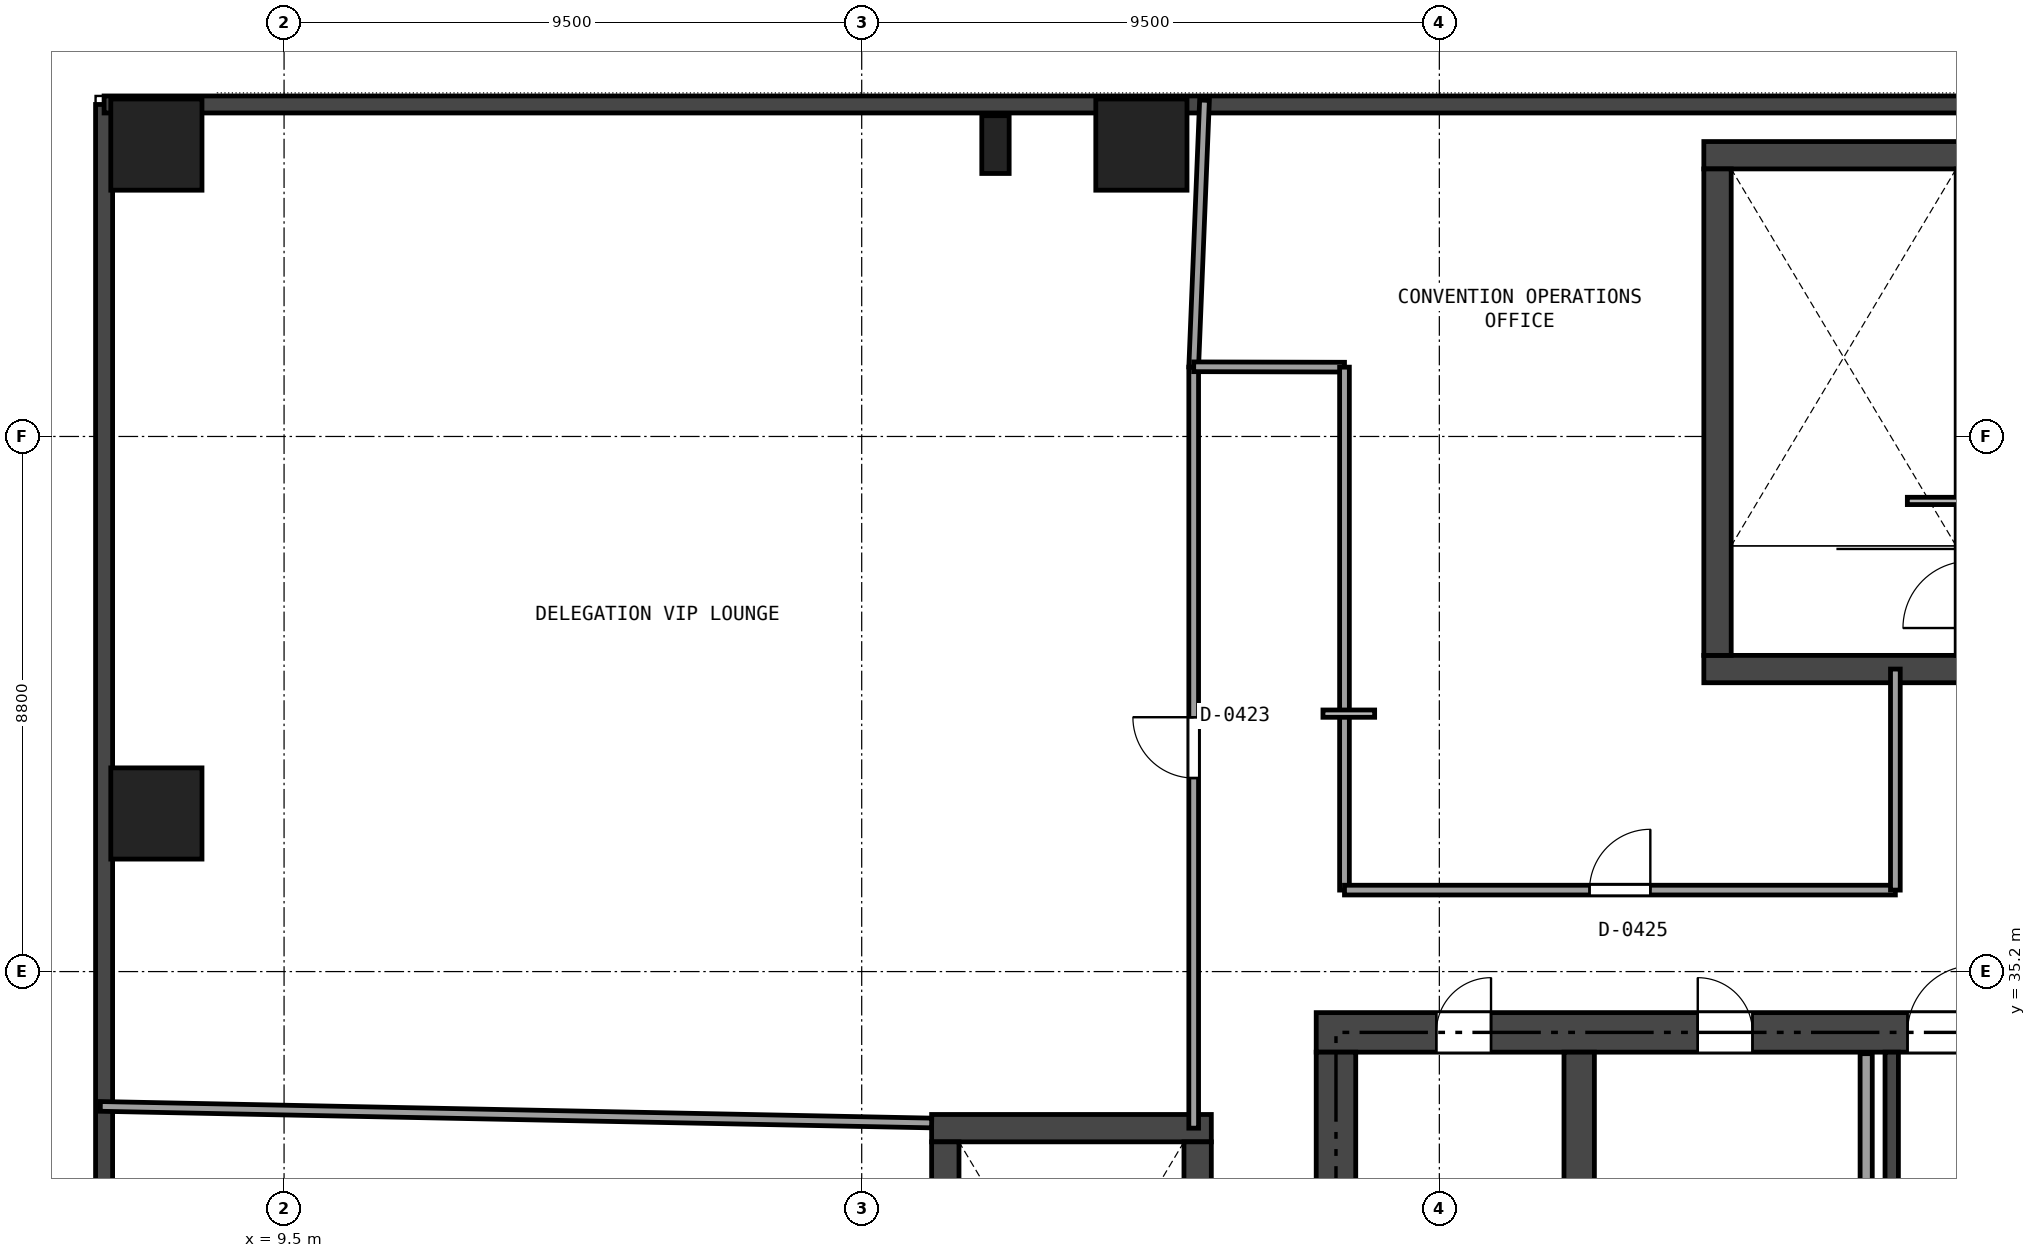
"""IFC4 building model, lengths in metres.
Left out: names, types, materials, properties, quantities, classifications, styles, units other than length and angle.
Written with IfcOpenShell. Run it as: python <this file> out.ifc"""

import sys

from ifc_helpers import new_model, si_unit, direction, frame, frame_2d, origin, origin_2d, place, context, subcontext, project, spatial, rectangle, extrude, element, fill, save


model = new_model("IFC4")
c1 = context("Model", 3, precision=1e-05, world=origin(), true_north=direction((0.0, 1.0)))
c2 = subcontext(c1, "Body", "Model", "MODEL_VIEW")
j1 = project(units=[si_unit("LENGTHUNIT", "METRE"), si_unit("PLANEANGLEUNIT", "RADIAN")], contexts=[c1])
p1 = place(None, origin())
s1 = spatial("IfcSite", under=j1, at=p1, CompositionType="ELEMENT")
p2 = place(p1, origin())
s2 = spatial("IfcBuilding", under=s1, at=p2, CompositionType="ELEMENT")
p3 = place(p2, frame((0.0, 0.0, 21.6)))
s3 = spatial("IfcBuildingStorey", under=s2, at=p3, CompositionType="ELEMENT", Elevation=21.6)
p4 = place(p3, frame((26.475, 34.2, 0.0), z_axis=(0.0, 0.0, 1.0), x_axis=(1.0, 0.0, 0.0)))
e1 = element("IfcWall", 1, at=p4, inside=s3, PredefinedType="SHEAR", context=c2, shape_type="SweptSolid", body=[
    extrude(rectangle(XDim=21.45, YDim=0.65, at=frame_2d((10.725, 0.0))), origin(), (0.0, 0.0, 1.0), 4.98),
])
p5 = place(p4, frame((9.725, 0.0, 0.0)))
e2 = element("IfcOpeningElement", 2, at=p5, cuts=e1, PredefinedType="OPENING", context=c2, shape_type="SweptSolid", body=[
    extrude(rectangle(XDim=1.1, YDim=2.15, at=frame_2d((0.55, 1.075))), frame((0.0, 0.335, 0.0), z_axis=(0.0, -1.0, 0.0), x_axis=(1.0, 0.0, 0.0)), (0.0, 0.0, 1.0), 0.67),
])
p6 = place(p4, frame((1.975, 0.0, 0.0)))
e3 = element("IfcOpeningElement", 3, at=p6, cuts=e1, PredefinedType="OPENING", context=c2, shape_type="SweptSolid", body=[
    extrude(rectangle(XDim=0.9, YDim=2.1, at=frame_2d((0.45, 1.05))), frame((0.0, 0.335, 0.0), z_axis=(0.0, -1.0, 0.0), x_axis=(1.0, 0.0, 0.0)), (0.0, 0.0, 1.0), 0.67),
])
p7 = place(p4, frame((6.275, 0.0, 0.0)))
e4 = element("IfcOpeningElement", 4, at=p7, cuts=e1, PredefinedType="OPENING", context=c2, shape_type="SweptSolid", body=[
    extrude(rectangle(XDim=0.9, YDim=2.1, at=frame_2d((0.45, 1.05))), frame((0.0, 0.335, 0.0), z_axis=(0.0, -1.0, 0.0), x_axis=(1.0, 0.0, 0.0)), (0.0, 0.0, 1.0), 0.67),
])
p8 = place(p3, frame((26.8, 18.925, 0.0), z_axis=(0.0, 0.0, 1.0), x_axis=(0.0, 1.0, 0.0)))
e5 = element("IfcWall", 5, at=p8, inside=s3, PredefinedType="SHEAR", context=c2, shape_type="SweptSolid", body=[
    extrude(rectangle(XDim=14.95, YDim=0.65, at=frame_2d((7.475, 0.0))), origin(), (0.0, 0.0, 1.0), 4.98),
])
p9 = place(p3, frame((30.8, 18.925, 0.0), z_axis=(0.0, 0.0, 1.0), x_axis=(0.0, 1.0, 0.0)))
e6 = element("IfcWall", 6, at=p9, inside=s3, PredefinedType="SHEAR", context=c2, shape_type="SweptSolid", body=[
    extrude(rectangle(XDim=14.95, YDim=0.5, at=frame_2d((7.475, 0.0))), origin(), (0.0, 0.0, 1.0), 4.98),
])
p10 = place(p9, frame((6.575, 0.0, 0.0)))
e7 = element("IfcOpeningElement", 7, at=p10, cuts=e6, PredefinedType="OPENING", context=c2, shape_type="SweptSolid", body=[
    extrude(rectangle(XDim=1.1, YDim=2.15, at=frame_2d((0.55, 1.075))), frame((0.0, 0.26, 0.0), z_axis=(0.0, -1.0, 0.0), x_axis=(1.0, 0.0, 0.0)), (0.0, 0.0, 1.0), 0.52),
])
p11 = place(p9, frame((8.375, 0.0, 0.0)))
e8 = element("IfcOpeningElement", 8, at=p11, cuts=e6, PredefinedType="OPENING", context=c2, shape_type="SweptSolid", body=[
    extrude(rectangle(XDim=0.9, YDim=2.1, at=frame_2d((0.45, 1.05))), frame((0.0, 0.26, 0.0), z_axis=(0.0, -1.0, 0.0), x_axis=(1.0, 0.0, 0.0)), (0.0, 0.0, 1.0), 0.52),
])
p12 = place(p3, frame((35.94, 30.75, 0.0), z_axis=(0.0, 0.0, 1.0), x_axis=(0.0, 1.0, 0.0)))
e9 = element("IfcWall", 9, at=p12, inside=s3, PredefinedType="SHEAR", context=c2, shape_type="SweptSolid", body=[
    extrude(rectangle(XDim=3.125, YDim=0.22, at=frame_2d((1.562, 0.0))), origin(), (0.0, 0.0, 1.0), 4.98),
])
p13 = place(p3, frame((20.15, 32.625, 0.0), z_axis=(0.0, 0.0, 1.0), x_axis=(1.0, 0.0, 0.0)))
e10 = element("IfcWall", 10, at=p13, inside=s3, PredefinedType="SHEAR", context=c2, shape_type="SweptSolid", body=[
    extrude(rectangle(XDim=4.6, YDim=0.45, at=frame_2d((2.3, 0.0))), origin(), (0.0, 0.0, 1.0), 4.98),
])
p14 = place(p3, frame((20.375, 24.4, 0.0), z_axis=(0.0, 0.0, 1.0), x_axis=(0.0, 1.0, 0.0)))
e11 = element("IfcWall", 11, at=p14, inside=s3, PredefinedType="SHEAR", context=c2, shape_type="SweptSolid", body=[
    extrude(rectangle(XDim=8.0, YDim=0.45, at=frame_2d((4.0, 0.0))), origin(), (0.0, 0.0, 1.0), 4.98),
])
p15 = place(p3, frame((24.525, 24.4, 0.0), z_axis=(0.0, 0.0, 1.0), x_axis=(0.0, 1.0, 0.0)))
e12 = element("IfcWall", 12, at=p15, inside=s3, PredefinedType="SHEAR", context=c2, shape_type="SweptSolid", body=[
    extrude(rectangle(XDim=8.0, YDim=0.45, at=frame_2d((4.0, 0.0))), origin(), (0.0, 0.0, 1.0), 4.98),
])
p16 = place(p15, frame((0.45, 0.0, 0.0)))
e13 = element("IfcOpeningElement", 13, at=p16, cuts=e12, PredefinedType="OPENING", context=c2, shape_type="SweptSolid", body=[
    extrude(rectangle(XDim=1.1, YDim=2.15, at=frame_2d((0.55, 1.075))), frame((0.0, 0.235, 0.0), z_axis=(0.0, -1.0, 0.0), x_axis=(1.0, 0.0, 0.0)), (0.0, 0.0, 1.0), 0.47),
])
for number, where, z_axis, x_axis in (
    (14, (32.85, 40.175, 0.0), (0.0, 0.0, 1.0), (1.0, 0.0, 0.0)),
    (15, (32.85, 48.625, 0.0), (0.0, 0.0, 1.0), (1.0, 0.0, 0.0)),
):
    element("IfcWall", number, at=place(p3, frame(where, z_axis=z_axis, x_axis=x_axis)), inside=s3, PredefinedType="SHEAR", context=c2, shape_type="SweptSolid", body=[
        extrude(rectangle(XDim=4.6, YDim=0.45, at=frame_2d((2.3, 0.0))), origin(), (0.0, 0.0, 1.0), 4.98),
    ])
p17 = place(p3, frame((33.075, 40.4, 0.0), z_axis=(0.0, 0.0, 1.0), x_axis=(0.0, 1.0, 0.0)))
e16 = element("IfcWall", 16, at=p17, inside=s3, PredefinedType="SHEAR", context=c2, shape_type="SweptSolid", body=[
    extrude(rectangle(XDim=8.0, YDim=0.45, at=frame_2d((4.0, 0.0))), origin(), (0.0, 0.0, 1.0), 4.98),
])
for number, where, z_axis, x_axis in (
    (17, (23.6, 48.8, 0.0), (0.0, 0.0, 1.0), (1.0, 0.0, 0.0)),
    (18, (7.4, 48.8, 0.0), (0.0, 0.0, 1.0), (1.0, 0.0, 0.0)),
    (19, (7.4, 37.8, 0.0), (0.0, 0.0, 1.0), (1.0, 0.0, 0.0)),
):
    element("IfcColumn", number, at=place(p3, frame(where, z_axis=z_axis, x_axis=x_axis)), inside=s3, PredefinedType="COLUMN", context=c2, shape_type="SweptSolid", body=[
        extrude(rectangle(XDim=1.5, YDim=1.5, at=origin_2d()), origin(), (0.0, 0.0, 1.0), 4.98),
    ])
p18 = place(p3, frame((21.2, 48.8, 0.0), z_axis=(0.0, 0.0, 1.0), x_axis=(1.0, 0.0, 0.0)))
e20 = element("IfcColumn", 20, at=p18, inside=s3, PredefinedType="PILASTER", context=c2, shape_type="SweptSolid", body=[
    extrude(rectangle(XDim=0.45, YDim=0.95, at=origin_2d()), origin(), (0.0, 0.0, 1.0), 4.98),
])
p19 = place(p3, frame((6.54, 10.74, 0.0), z_axis=(0.0, 0.0, 1.0), x_axis=(0.0, 1.0, 0.0)))
e21 = element("IfcWall", 21, at=p19, inside=s3, PredefinedType="SOLIDWALL", context=c2, shape_type="SweptSolid", body=[
    extrude(rectangle(XDim=38.72, YDim=0.28, at=frame_2d((19.36, 0.0))), origin(), (0.0, 0.0, 1.0), 4.98),
])
p20 = place(p3, frame((6.54, 49.46, 0.0), z_axis=(0.0, 0.0, 1.0), x_axis=(1.0, 0.0, 0.0)))
e22 = element("IfcWall", 22, at=p20, inside=s3, PredefinedType="SOLIDWALL", context=c2, shape_type="SweptSolid", body=[
    extrude(rectangle(XDim=61.32, YDim=0.28, at=frame_2d((30.66, 0.0))), origin(), (0.0, 0.0, 1.0), 4.98),
])
p21 = place(p3, frame((35.52, 18.95, 0.0), z_axis=(0.0, 0.0, 1.0), x_axis=(0.0, 1.0, 0.0)))
e23 = element("IfcWall", 23, at=p21, inside=s3, PredefinedType="SOLIDWALL", context=c2, shape_type="SweptSolid", body=[
    extrude(rectangle(XDim=14.9, YDim=0.2, at=frame_2d((7.45, 0.0))), origin(), (0.0, 0.0, 1.0), 4.501),
])
p22 = place(p21, frame((7.755, 0.0, 0.0)))
e24 = element("IfcOpeningElement", 24, at=p22, cuts=e23, PredefinedType="OPENING", context=c2, shape_type="SweptSolid", body=[
    extrude(rectangle(XDim=0.95, YDim=2.15, at=frame_2d((0.475, 1.075))), frame((0.0, 0.11, 0.0), z_axis=(0.0, -1.0, 0.0), x_axis=(1.0, 0.0, 0.0)), (0.0, 0.0, 1.0), 0.22),
])
p23 = place(p21, frame((0.6, 0.0, 0.0)))
e25 = element("IfcOpeningElement", 25, at=p23, cuts=e23, PredefinedType="OPENING", context=c2, shape_type="SweptSolid", body=[
    extrude(rectangle(XDim=0.9, YDim=2.1, at=frame_2d((0.45, 1.05))), frame((0.0, 0.11, 0.0), z_axis=(0.0, -1.0, 0.0), x_axis=(1.0, 0.0, 0.0)), (0.0, 0.0, 1.0), 0.22),
])
p24 = place(p3, frame((20.15, 32.71, 0.0), z_axis=(0.0, 0.0, 1.0), x_axis=(-0.999800773201, 0.019960308294, 0.0)))
e26 = element("IfcWall", 26, at=p24, inside=s3, PredefinedType="PARTITIONING", context=c2, shape_type="SweptSolid", body=[
    extrude(rectangle(XDim=13.675, YDim=0.16, at=frame_2d((6.837, 0.0))), origin(), (0.0, 0.0, 1.0), 4.121),
])
p25 = place(p3, frame((24.46, 32.625, 0.0), z_axis=(0.0, 0.0, 1.0), x_axis=(0.0, 1.0, 0.0)))
e27 = element("IfcWall", 27, at=p25, inside=s3, PredefinedType="PARTITIONING", context=c2, shape_type="SweptSolid", body=[
    extrude(rectangle(XDim=12.515, YDim=0.16, at=frame_2d((6.257, 0.0))), origin(), (0.0, 0.0, 1.0), 3.847),
])
p26 = place(p25, frame((5.758, 0.0, 0.0)))
e28 = element("IfcOpeningElement", 28, at=p26, cuts=e27, PredefinedType="OPENING", context=c2, shape_type="SweptSolid", body=[
    extrude(rectangle(XDim=1.0, YDim=2.15, at=frame_2d((0.5, 1.075))), frame((0.0, 0.09, 0.0), z_axis=(0.0, -1.0, 0.0), x_axis=(1.0, 0.0, 0.0)), (0.0, 0.0, 1.0), 0.18),
])
p27 = place(p3, frame((24.46, 45.14, 0.0), z_axis=(0.0, 0.0, 1.0), x_axis=(0.040507266643, 0.999179243854, 0.0)))
e29 = element("IfcWall", 29, at=p27, inside=s3, PredefinedType="PARTITIONING", context=c2, shape_type="SweptSolid", body=[
    extrude(rectangle(XDim=4.394, YDim=0.16, at=frame_2d((2.197, 0.0))), origin(), (0.0, 0.0, 1.0), 3.847),
])
p28 = place(p3, frame((24.46, 45.146, 0.0), z_axis=(0.0, 0.0, 1.0), x_axis=(0.999996971472, -0.002461106939, 0.0)))
e30 = element("IfcWall", 30, at=p28, inside=s3, PredefinedType="PARTITIONING", context=c2, shape_type="SweptSolid", body=[
    extrude(rectangle(XDim=2.48, YDim=0.16, at=frame_2d((1.24, 0.0))), origin(), (0.0, 0.0, 1.0), 3.847),
])
p29 = place(p3, frame((26.94, 45.14, 0.0), z_axis=(0.0, 0.0, 1.0), x_axis=(0.0, -1.0, 0.0)))
e31 = element("IfcWall", 31, at=p29, inside=s3, PredefinedType="PARTITIONING", context=c2, shape_type="SweptSolid", body=[
    extrude(rectangle(XDim=8.6, YDim=0.16, at=frame_2d((4.3, 0.0))), origin(), (0.0, 0.0, 1.0), 3.847),
])
p30 = place(p3, frame((26.94, 36.54, 0.0), z_axis=(0.0, 0.0, 1.0), x_axis=(1.0, 0.0, 0.0)))
e32 = element("IfcWall", 32, at=p30, inside=s3, PredefinedType="PARTITIONING", context=c2, shape_type="SweptSolid", body=[
    extrude(rectangle(XDim=9.06, YDim=0.16, at=frame_2d((4.53, 0.0))), origin(), (0.0, 0.0, 1.0), 3.847),
])
p31 = place(p30, frame((4.03, 0.0, 0.0)))
e33 = element("IfcOpeningElement", 33, at=p31, cuts=e32, PredefinedType="OPENING", context=c2, shape_type="SweptSolid", body=[
    extrude(rectangle(XDim=1.0, YDim=2.15, at=frame_2d((0.5, 1.075))), frame((0.0, 0.09, 0.0), z_axis=(0.0, -1.0, 0.0), x_axis=(1.0, 0.0, 0.0)), (0.0, 0.0, 1.0), 0.18),
])
p32 = place(p3, frame((36.0, 36.54, 0.0), z_axis=(0.0, 0.0, 1.0), x_axis=(0.0, 1.0, 0.0)))
e34 = element("IfcWall", 34, at=p32, inside=s3, PredefinedType="PARTITIONING", context=c2, shape_type="SweptSolid", body=[
    extrude(rectangle(XDim=3.635, YDim=0.16, at=frame_2d((1.817, 0.0))), origin(), (0.0, 0.0, 1.0), 4.98),
])
p33 = place(p5, origin())
e35 = element("IfcDoor", 35, at=p33, inside=s3, OperationType="SINGLE_SWING_RIGHT", PredefinedType="DOOR", context=c2, shape_type="SweptSolid", body=[
    extrude(rectangle(XDim=1.1, YDim=2.15, at=frame_2d((0.55, 1.075))), frame((0.0, 0.025, 0.0), z_axis=(0.0, -1.0, 0.0), x_axis=(1.0, 0.0, 0.0)), (0.0, 0.0, 1.0), 0.05),
])
fill(e2, e35)
p34 = place(p6, origin())
e36 = element("IfcDoor", 36, at=p34, inside=s3, OperationType="SINGLE_SWING_RIGHT", PredefinedType="DOOR", context=c2, shape_type="SweptSolid", body=[
    extrude(rectangle(XDim=0.9, YDim=2.1, at=frame_2d((0.45, 1.05))), frame((0.0, 0.025, 0.0), z_axis=(0.0, -1.0, 0.0), x_axis=(1.0, 0.0, 0.0)), (0.0, 0.0, 1.0), 0.05),
])
fill(e3, e36)
p35 = place(p7, origin())
e37 = element("IfcDoor", 37, at=p35, inside=s3, OperationType="SINGLE_SWING_LEFT", PredefinedType="DOOR", context=c2, shape_type="SweptSolid", body=[
    extrude(rectangle(XDim=0.9, YDim=2.1, at=frame_2d((0.45, 1.05))), frame((0.0, 0.025, 0.0), z_axis=(0.0, -1.0, 0.0), x_axis=(1.0, 0.0, 0.0)), (0.0, 0.0, 1.0), 0.05),
])
fill(e4, e37)
p36 = place(p26, origin())
e38 = element("IfcDoor", 38, at=p36, inside=s3, OperationType="SINGLE_SWING_RIGHT", PredefinedType="DOOR", context=c2, shape_type="SweptSolid", body=[
    extrude(rectangle(XDim=1.0, YDim=2.15, at=frame_2d((0.5, 1.075))), frame((0.0, 0.025, 0.0), z_axis=(0.0, -1.0, 0.0), x_axis=(1.0, 0.0, 0.0)), (0.0, 0.0, 1.0), 0.05),
])
fill(e28, e38)
p37 = place(p31, origin())
e39 = element("IfcDoor", 39, at=p37, inside=s3, OperationType="SINGLE_SWING_RIGHT", PredefinedType="DOOR", context=c2, shape_type="SweptSolid", body=[
    extrude(rectangle(XDim=1.0, YDim=2.15, at=frame_2d((0.5, 1.075))), frame((0.0, 0.025, 0.0), z_axis=(0.0, -1.0, 0.0), x_axis=(1.0, 0.0, 0.0)), (0.0, 0.0, 1.0), 0.05),
])
fill(e33, e39)
save(model, sys.argv[1])
